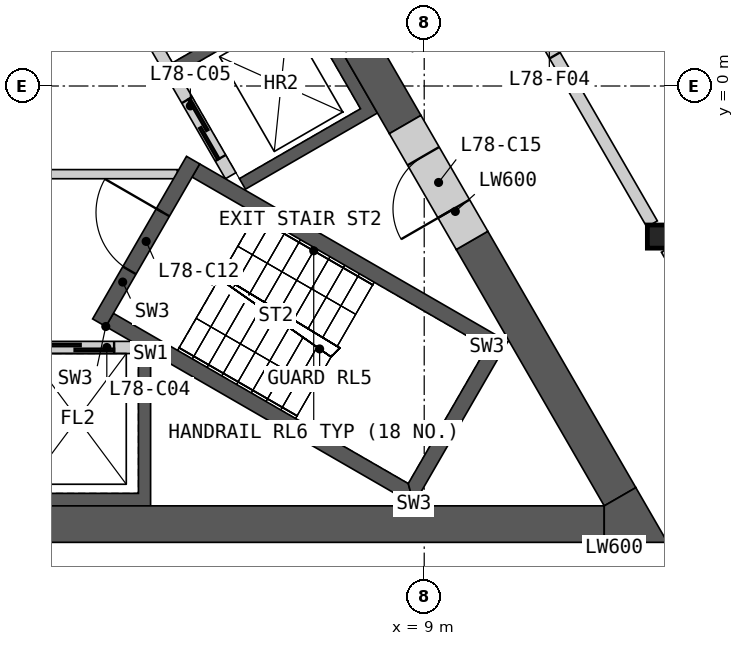
"""IFC4 building model, lengths in metres.
Left out: names, types, materials, properties, quantities, classifications, styles, units other than length and angle.
Written with IfcOpenShell. Run it as: python <this file> out.ifc"""

import sys

from ifc_helpers import new_model, si_unit, direction, frame, frame_2d, origin, origin_2d, place, context, subcontext, project, spatial, polyline, rectangle, i_section, outline, extrude, element, fill, save


model = new_model("IFC4")
c1 = context("Model", 3, precision=1e-05, world=origin(), true_north=direction((0.0, 1.0)))
c2 = subcontext(c1, "Body", "Model", "MODEL_VIEW")
j1 = project(units=[si_unit("LENGTHUNIT", "METRE"), si_unit("PLANEANGLEUNIT", "RADIAN")], contexts=[c1])
p1 = place(None, origin())
s1 = spatial("IfcSite", under=j1, at=p1, CompositionType="ELEMENT")
p2 = place(p1, origin())
s2 = spatial("IfcBuilding", under=s1, at=p2, CompositionType="ELEMENT")
p3 = place(p2, frame((0.0, 0.0, 346.0)))
s3 = spatial("IfcBuildingStorey", under=s2, at=p3, CompositionType="ELEMENT", Elevation=346.0)
p4 = place(p3, frame((12.868, -2.476, 0.0), z_axis=(0.0, 0.0, 1.0), x_axis=(1.0, 0.0, 0.0)))
e1 = element("IfcColumn", 1, at=p4, inside=s3, PredefinedType="COLUMN", context=c2, shape_type="SweptSolid", body=[
    extrude(i_section(OverallWidth=0.396, OverallDepth=0.381, WebThickness=0.019, FlangeThickness=0.03, at=origin_2d()), origin(), (0.0, 0.0, 1.0), 10.0),
])
p5 = place(p3, origin())
e2 = element("IfcWall", 2, at=p5, inside=s3, PredefinedType="SHEAR", context=c2, shape_type="SweptSolid", body=[
    extrude(outline(polyline([(4.5, -4.4), (4.5, -6.906), (-4.5, -6.906), (-4.5, -4.4), (-4.3, -4.4), (-4.3, -6.7), (-2.3, -6.7), (-2.3, -4.4), (-2.1, -4.4), (-2.1, -6.7), (-0.1, -6.7), (-0.1, -4.4), (0.1, -4.4), (0.1, -6.7), (2.1, -6.7), (2.1, -4.4), (2.3, -4.4), (2.3, -6.7), (4.3, -6.7), (4.3, -4.4), (4.5, -4.4)])), origin(), (0.0, 0.0, 1.0), 9.7),
])
p6 = place(p3, frame((-4.187, -4.3, 0.0), z_axis=(0.0, 0.0, 1.0), x_axis=(1.0, 0.0, 0.0)))
e3 = element("IfcWall", 3, at=p6, inside=s3, PredefinedType="SOLIDWALL", context=c2, shape_type="SweptSolid", body=[
    extrude(rectangle(XDim=8.373, YDim=0.2, at=frame_2d((4.187, 0.0))), origin(), (0.0, 0.0, 1.0), 9.7),
])
p7 = place(p6, frame((0.287, 0.0, 0.0)))
e4 = element("IfcOpeningElement", 4, at=p7, cuts=e3, PredefinedType="OPENING", context=c2, shape_type="SweptSolid", body=[
    extrude(rectangle(XDim=1.2, YDim=2.1, at=frame_2d((0.6, 1.05))), frame((0.0, 0.11, 0.0), z_axis=(0.0, -1.0, 0.0), x_axis=(1.0, 0.0, 0.0)), (0.0, 0.0, 1.0), 0.22),
])
p8 = place(p6, frame((2.387, 0.0, 0.0)))
e5 = element("IfcOpeningElement", 5, at=p8, cuts=e3, PredefinedType="OPENING", context=c2, shape_type="SweptSolid", body=[
    extrude(rectangle(XDim=1.4, YDim=2.1, at=frame_2d((0.7, 1.05))), frame((0.0, 0.11, 0.0), z_axis=(0.0, -1.0, 0.0), x_axis=(1.0, 0.0, 0.0)), (0.0, 0.0, 1.0), 0.22),
])
p9 = place(p6, frame((4.737, 0.0, 0.0)))
e6 = element("IfcOpeningElement", 6, at=p9, cuts=e3, PredefinedType="OPENING", context=c2, shape_type="SweptSolid", body=[
    extrude(rectangle(XDim=1.1, YDim=2.1, at=frame_2d((0.55, 1.05))), frame((0.0, 0.11, 0.0), z_axis=(0.0, -1.0, 0.0), x_axis=(1.0, 0.0, 0.0)), (0.0, 0.0, 1.0), 0.22),
])
p10 = place(p6, frame((6.887, 0.0, 0.0)))
e7 = element("IfcOpeningElement", 7, at=p10, cuts=e3, PredefinedType="OPENING", context=c2, shape_type="SweptSolid", body=[
    extrude(rectangle(XDim=1.2, YDim=2.1, at=frame_2d((0.6, 1.05))), frame((0.0, 0.11, 0.0), z_axis=(0.0, -1.0, 0.0), x_axis=(1.0, 0.0, 0.0)), (0.0, 0.0, 1.0), 0.22),
])
p11 = place(p3, origin())
e8 = element("IfcWall", 8, at=p11, inside=s3, PredefinedType="SHEAR", context=c2, shape_type="SweptSolid", body=[
    extrude(outline(polyline([(1.561, 6.097), (3.731, 7.35), (8.231, -0.444), (6.061, -1.697), (5.96, -1.524), (7.952, -0.374), (6.952, 1.358), (4.96, 0.208), (4.861, 0.381), (6.852, 1.531), (5.852, 3.263), (3.861, 2.113), (3.76, 2.287), (5.752, 3.437), (4.752, 5.169), (2.76, 4.019), (2.66, 4.192), (4.652, 5.342), (3.652, 7.074), (1.66, 5.924), (1.561, 6.097)])), origin(), (0.0, 0.0, 1.0), 9.7),
])
p12 = place(p3, frame((5.817, -1.476, 0.0), z_axis=(0.0, 0.0, 1.0), x_axis=(-0.500002616675, 0.866023893041, 0.0)))
e9 = element("IfcWall", 9, at=p12, inside=s3, PredefinedType="SOLIDWALL", context=c2, shape_type="SweptSolid", body=[
    extrude(rectangle(XDim=8.373, YDim=0.2, at=frame_2d((4.187, 0.0))), origin(), (0.0, 0.0, 1.0), 9.7),
])
p13 = place(p12, frame((0.337, 0.0, 0.0)))
e10 = element("IfcOpeningElement", 10, at=p13, cuts=e9, PredefinedType="OPENING", context=c2, shape_type="SweptSolid", body=[
    extrude(rectangle(XDim=1.1, YDim=2.1, at=frame_2d((0.55, 1.05))), frame((0.0, 0.11, 0.0), z_axis=(0.0, -1.0, 0.0), x_axis=(1.0, 0.0, 0.0)), (0.0, 0.0, 1.0), 0.22),
])
p14 = place(p12, frame((2.537, 0.0, 0.0)))
e11 = element("IfcOpeningElement", 11, at=p14, cuts=e9, PredefinedType="OPENING", context=c2, shape_type="SweptSolid", body=[
    extrude(rectangle(XDim=1.1, YDim=2.1, at=frame_2d((0.55, 1.05))), frame((0.0, 0.11, 0.0), z_axis=(0.0, -1.0, 0.0), x_axis=(1.0, 0.0, 0.0)), (0.0, 0.0, 1.0), 0.22),
])
p15 = place(p12, frame((4.737, 0.0, 0.0)))
e12 = element("IfcOpeningElement", 12, at=p15, cuts=e9, PredefinedType="OPENING", context=c2, shape_type="SweptSolid", body=[
    extrude(rectangle(XDim=1.1, YDim=2.1, at=frame_2d((0.55, 1.05))), frame((0.0, 0.11, 0.0), z_axis=(0.0, -1.0, 0.0), x_axis=(1.0, 0.0, 0.0)), (0.0, 0.0, 1.0), 0.22),
])
p16 = place(p12, frame((7.037, 0.0, 0.0)))
e13 = element("IfcOpeningElement", 13, at=p16, cuts=e9, PredefinedType="OPENING", context=c2, shape_type="SweptSolid", body=[
    extrude(rectangle(XDim=0.9, YDim=2.1, at=frame_2d((0.45, 1.05))), frame((0.0, 0.11, 0.0), z_axis=(0.0, -1.0, 0.0), x_axis=(1.0, 0.0, 0.0)), (0.0, 0.0, 1.0), 0.22),
])
p17 = place(p3, frame((-4.941, -1.45, 0.0), z_axis=(0.0, 0.0, 1.0), x_axis=(1.0, 0.0, 0.0)))
e14 = element("IfcWall", 14, at=p17, inside=s3, PredefinedType="PARTITIONING", context=c2, shape_type="SweptSolid", body=[
    extrude(rectangle(XDim=9.882, YDim=0.15, at=frame_2d((4.941, 0.0))), origin(), (0.0, 0.0, 1.0), 9.7),
])
p18 = place(p17, frame((4.391, 0.0, 0.0)))
e15 = element("IfcOpeningElement", 15, at=p18, cuts=e14, PredefinedType="OPENING", context=c2, shape_type="SweptSolid", body=[
    extrude(rectangle(XDim=1.1, YDim=2.1, at=frame_2d((0.55, 1.05))), frame((0.0, 0.085, 0.0), z_axis=(0.0, -1.0, 0.0), x_axis=(1.0, 0.0, 0.0)), (0.0, 0.0, 1.0), 0.17),
])
p19 = place(p3, origin())
e16 = element("IfcWall", 16, at=p19, inside=s3, PredefinedType="SHEAR", context=c2, shape_type="SweptSolid", body=[
    extrude(outline(polyline([(3.763, -3.956), (8.83, -6.881), (8.738, -6.539), (3.888, -3.739), (3.763, -3.956)])), origin(), (0.0, 0.0, 1.0), 9.7),
])
p20 = place(p3, origin())
e17 = element("IfcWall", 17, at=p20, inside=s3, PredefinedType="SHEAR", context=c2, shape_type="SweptSolid", body=[
    extrude(outline(polyline([(8.83, -6.881), (10.374, -4.206), (10.032, -4.298), (8.738, -6.539), (8.83, -6.881)])), origin(), (0.0, 0.0, 1.0), 9.7),
])
p21 = place(p3, origin())
e18 = element("IfcWall", 18, at=p21, inside=s3, PredefinedType="SHEAR", context=c2, shape_type="SweptSolid", body=[
    extrude(outline(polyline([(10.032, -4.298), (10.374, -4.206), (5.307, -1.281), (5.182, -1.498), (10.032, -4.298)])), origin(), (0.0, 0.0, 1.0), 9.7),
])
p22 = place(p3, frame((3.655, -3.893, 0.0), z_axis=(0.0, 0.0, 1.0), x_axis=(0.499982516597, 0.866035497597, 0.0)))
e19 = element("IfcWall", 19, at=p22, inside=s3, PredefinedType="SHEAR", context=c2, shape_type="SweptSolid", body=[
    extrude(rectangle(XDim=3.088, YDim=0.25, at=frame_2d((1.544, 0.0))), origin(), (0.0, 0.0, 1.0), 9.7),
])
p23 = place(p22, frame((0.994, 0.0, 0.0)))
e20 = element("IfcOpeningElement", 20, at=p23, cuts=e19, PredefinedType="OPENING", context=c2, shape_type="SweptSolid", body=[
    extrude(rectangle(XDim=1.1, YDim=2.1, at=frame_2d((0.55, 1.05))), frame((0.0, 0.135, 0.0), z_axis=(0.0, -1.0, 0.0), x_axis=(1.0, 0.0, 0.0)), (0.0, 0.0, 1.0), 0.27),
])
for number, where, z_axis, x_axis in (
    (21, (-4.892, -7.206, 0.0), (0.0, 0.0, 1.0), (1.0, 0.0, 0.0)),
    (22, (8.686, -0.634, 0.0), (0.0, 0.0, 1.0), (-0.5, 0.866, 0.0)),
):
    element("IfcWall", number, at=place(p3, frame(where, z_axis=z_axis, x_axis=x_axis)), inside=s3, PredefinedType="SHEAR", context=c2, shape_type="SweptSolid", body=[
        extrude(rectangle(XDim=16.853, YDim=0.6, at=frame_2d((8.426, 0.0))), origin(), (0.0, 0.0, 1.0), 9.7),
    ])
p24 = place(p3, frame((12.221, -6.756, 0.0), z_axis=(0.0, 0.0, 1.0), x_axis=(-0.50000604952, 0.866021911064, 0.0)))
e23 = element("IfcWall", 23, at=p24, inside=s3, PredefinedType="SHEAR", context=c2, shape_type="SweptSolid", body=[
    extrude(rectangle(XDim=4.869, YDim=0.6, at=frame_2d((2.434, 0.0))), origin(), (0.0, 0.0, 1.0), 9.7),
])
p25 = place(p3, origin())
e24 = element("IfcWall", 24, at=p25, inside=s3, PredefinedType="SHEAR", context=c2, shape_type="SweptSolid", body=[
    extrude(outline(polyline([(11.961, -7.506), (11.961, -6.906), (12.48, -6.606), (13.0, -7.506), (11.961, -7.506)])), origin(), (0.0, 0.0, 1.0), 9.7),
])
p26 = place(p3, frame((9.786, -2.539, 0.0), z_axis=(0.0, 0.0, 1.0), x_axis=(-0.499981787252, 0.866035918664, 0.0)))
e25 = element("IfcWall", 25, at=p26, inside=s3, PredefinedType="SHEAR", context=c2, shape_type="SweptSolid", body=[
    extrude(rectangle(XDim=2.2, YDim=0.6, at=frame_2d((1.1, 0.0))), origin(), (0.0, 0.0, 1.0), 9.7),
])
p27 = place(p26, frame((0.6, 0.0, 0.0)))
e26 = element("IfcOpeningElement", 26, at=p27, cuts=e25, PredefinedType="OPENING", context=c2, shape_type="SweptSolid", body=[
    extrude(rectangle(XDim=1.0, YDim=2.1, at=frame_2d((0.5, 1.05))), frame((0.0, 0.31, 0.0), z_axis=(0.0, -1.0, 0.0), x_axis=(1.0, 0.0, 0.0)), (0.0, 0.0, 1.0), 0.62),
])
p28 = place(p3, frame((8.698, 4.745, 0.0), z_axis=(0.0, 0.0, 1.0), x_axis=(0.499984266882, -0.866034487114, 0.0)))
e27 = element("IfcWall", 27, at=p28, inside=s3, PredefinedType="PARTITIONING", context=c2, shape_type="SweptSolid", body=[
    extrude(rectangle(XDim=8.099, YDim=0.2, at=frame_2d((4.049, 0.0))), origin(), (0.0, 0.0, 1.0), 9.7),
])
p29 = place(p28, frame((3.099, 0.0, 0.0)))
e28 = element("IfcOpeningElement", 28, at=p29, cuts=e27, PredefinedType="OPENING", context=c2, shape_type="SweptSolid", body=[
    extrude(rectangle(XDim=1.8, YDim=2.1, at=frame_2d((0.9, 1.05))), frame((0.0, 0.11, 0.0), z_axis=(0.0, -1.0, 0.0), x_axis=(1.0, 0.0, 0.0)), (0.0, 0.0, 1.0), 0.22),
])
p30 = place(p3, frame((12.988, -2.684, 0.0), z_axis=(0.0, 0.0, 1.0), x_axis=(0.49999094734, -0.866030630277, 0.0)))
e29 = element("IfcWall", 29, at=p30, inside=s3, PredefinedType="PARTITIONING", context=c2, shape_type="SweptSolid", body=[
    extrude(rectangle(XDim=4.513, YDim=0.2, at=frame_2d((2.256, 0.0))), origin(), (0.0, 0.0, 1.0), 9.7),
])
p31 = place(p10, origin())
e30 = element("IfcDoor", 30, at=p31, inside=s3, OperationType="SLIDING_TO_LEFT", PredefinedType="DOOR", context=c2, shape_type="SweptSolid", body=[
    extrude(rectangle(XDim=1.2, YDim=2.1, at=frame_2d((0.6, 1.05))), frame((0.0, 0.025, 0.0), z_axis=(0.0, -1.0, 0.0), x_axis=(1.0, 0.0, 0.0)), (0.0, 0.0, 1.0), 0.05),
])
fill(e7, e30)
p32 = place(p13, origin())
e31 = element("IfcDoor", 31, at=p32, inside=s3, OperationType="SLIDING_TO_LEFT", PredefinedType="DOOR", context=c2, shape_type="SweptSolid", body=[
    extrude(rectangle(XDim=1.1, YDim=2.1, at=frame_2d((0.55, 1.05))), frame((0.0, 0.025, 0.0), z_axis=(0.0, -1.0, 0.0), x_axis=(1.0, 0.0, 0.0)), (0.0, 0.0, 1.0), 0.05),
])
fill(e10, e31)
p33 = place(p23, origin())
e32 = element("IfcDoor", 32, at=p33, inside=s3, OperationType="SINGLE_SWING_RIGHT", PredefinedType="DOOR", context=c2, shape_type="SweptSolid", body=[
    extrude(rectangle(XDim=1.1, YDim=2.1, at=frame_2d((0.55, 1.05))), frame((0.0, 0.025, 0.0), z_axis=(0.0, -1.0, 0.0), x_axis=(1.0, 0.0, 0.0)), (0.0, 0.0, 1.0), 0.05),
])
fill(e20, e32)
p34 = place(p27, origin())
e33 = element("IfcDoor", 33, at=p34, inside=s3, OperationType="SINGLE_SWING_LEFT", PredefinedType="DOOR", context=c2, shape_type="SweptSolid", body=[
    extrude(rectangle(XDim=1.0, YDim=2.1, at=frame_2d((0.5, 1.05))), frame((0.0, 0.055, 0.0), z_axis=(0.0, -1.0, 0.0), x_axis=(1.0, 0.0, 0.0)), (0.0, 0.0, 1.0), 0.05),
])
fill(e26, e33)
p35 = place(p29, origin())
e34 = element("IfcDoor", 34, at=p35, inside=s3, OperationType="DOUBLE_DOOR_SINGLE_SWING", PredefinedType="DOOR", context=c2, shape_type="SweptSolid", body=[
    extrude(rectangle(XDim=1.8, YDim=2.1, at=frame_2d((0.9, 1.05))), frame((0.0, 0.025, 0.0), z_axis=(0.0, -1.0, 0.0), x_axis=(1.0, 0.0, 0.0)), (0.0, 0.0, 1.0), 0.05),
])
fill(e28, e34)
save(model, sys.argv[1])
